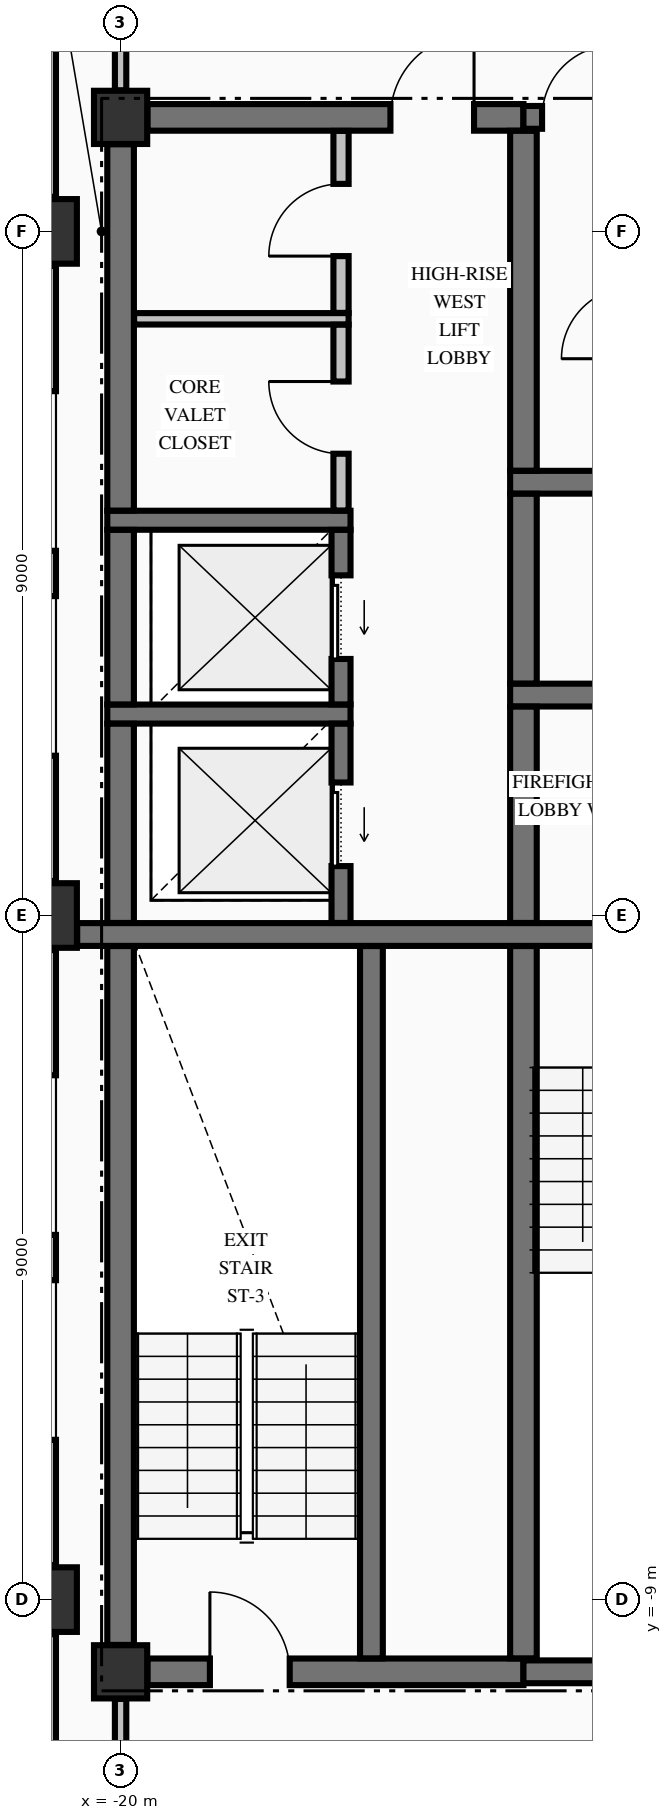
"""IFC4 building model, lengths in metres.
Left out: names, types, materials, properties, quantities, classifications, styles, units other than length and angle.
Written with IfcOpenShell. Run it as: python <this file> out.ifc"""

import sys

from ifc_helpers import new_model, si_unit, direction, frame, frame_2d, origin, origin_2d, place, context, subcontext, project, spatial, rectangle, extrude, element, fill, save


model = new_model("IFC4")
c1 = context("Model", 3, precision=1e-05, world=origin(), true_north=direction((0.0, 1.0)))
c2 = subcontext(c1, "Body", "Model", "MODEL_VIEW")
j1 = project(units=[si_unit("LENGTHUNIT", "METRE"), si_unit("PLANEANGLEUNIT", "RADIAN")], contexts=[c1])
p1 = place(None, origin())
s1 = spatial("IfcSite", under=j1, at=p1, CompositionType="ELEMENT")
p2 = place(p1, origin())
s2 = spatial("IfcBuilding", under=s1, at=p2, CompositionType="ELEMENT")
p3 = place(p2, frame((0.0, 0.0, 239.74)))
s3 = spatial("IfcBuildingStorey", under=s2, at=p3, CompositionType="ELEMENT", Elevation=239.74)
for number, where, z_axis, x_axis in (
    (1, (-21.0, -9.0, -0.25), (0.0, 0.0, 1.0), (1.0, 0.0, 0.0)),
    (2, (-21.0, 0.0, -0.25), (0.0, 0.0, 1.0), (1.0, 0.0, 0.0)),
    (3, (-21.0, 9.0, -0.25), (0.0, 0.0, 1.0), (1.0, 0.0, 0.0)),
):
    element("IfcColumn", number, at=place(p3, frame(where, z_axis=z_axis, x_axis=x_axis)), inside=s3, PredefinedType="COLUMN", context=c2, shape_type="SweptSolid", body=[
        extrude(rectangle(XDim=0.85, YDim=0.85, at=origin_2d()), origin(), (0.0, 0.0, 1.0), 3.23),
    ])
for number, where, z_axis, x_axis in (
    (4, (-20.0, -9.95, -0.25), (0.0, 0.0, 1.0), (1.0, 0.0, 0.0)),
    (5, (-20.0, 10.5, -0.25), (0.0, 0.0, 1.0), (1.0, 0.0, 0.0)),
):
    element("IfcColumn", number, at=place(p3, frame(where, z_axis=z_axis, x_axis=x_axis)), inside=s3, PredefinedType="COLUMN", context=c2, shape_type="SweptSolid", body=[
        extrude(rectangle(XDim=0.7, YDim=0.7, at=origin_2d()), origin(), (0.0, 0.0, 1.0), 3.23),
    ])
p4 = place(p3, frame((-21.0, -9.455, 0.0), z_axis=(0.0, 0.0, 1.0), x_axis=(0.0, -1.0, 0.0)))
e6 = element("IfcWall", 6, at=p4, inside=s3, PredefinedType="STANDARD", context=c2, shape_type="SweptSolid", body=[
    extrude(rectangle(XDim=8.09, YDim=0.3, at=frame_2d((4.045, 0.0))), origin(), (0.0, 0.0, 1.0), 2.372),
])
p5 = place(p3, frame((-21.0, -0.455, 0.0), z_axis=(0.0, 0.0, 1.0), x_axis=(0.0, -1.0, 0.0)))
e7 = element("IfcWall", 7, at=p5, inside=s3, PredefinedType="STANDARD", context=c2, shape_type="SweptSolid", body=[
    extrude(rectangle(XDim=8.09, YDim=0.3, at=frame_2d((4.045, 0.0))), origin(), (0.0, 0.0, 1.0), 2.372),
])
p6 = place(p5, frame((1.647, 0.0, 0.7)))
e8 = element("IfcOpeningElement", 8, at=p6, cuts=e7, PredefinedType="OPENING", context=c2, shape_type="SweptSolid", body=[
    extrude(rectangle(XDim=2.1, YDim=1.5, at=frame_2d((1.05, 0.75))), frame((0.0, 0.16, 0.0), z_axis=(0.0, -1.0, 0.0), x_axis=(1.0, 0.0, 0.0)), (0.0, 0.0, 1.0), 0.32),
])
p7 = place(p5, frame((4.343, 0.0, 0.7)))
e9 = element("IfcOpeningElement", 9, at=p7, cuts=e7, PredefinedType="OPENING", context=c2, shape_type="SweptSolid", body=[
    extrude(rectangle(XDim=2.1, YDim=1.5, at=frame_2d((1.05, 0.75))), frame((0.0, 0.16, 0.0), z_axis=(0.0, -1.0, 0.0), x_axis=(1.0, 0.0, 0.0)), (0.0, 0.0, 1.0), 0.32),
])
p8 = place(p3, frame((-21.0, 8.545, 0.0), z_axis=(0.0, 0.0, 1.0), x_axis=(0.0, -1.0, 0.0)))
e10 = element("IfcWall", 10, at=p8, inside=s3, PredefinedType="STANDARD", context=c2, shape_type="SweptSolid", body=[
    extrude(rectangle(XDim=8.09, YDim=0.3, at=frame_2d((4.045, 0.0))), origin(), (0.0, 0.0, 1.0), 2.372),
])
p9 = place(p8, frame((1.647, 0.0, 0.7)))
e11 = element("IfcOpeningElement", 11, at=p9, cuts=e10, PredefinedType="OPENING", context=c2, shape_type="SweptSolid", body=[
    extrude(rectangle(XDim=2.1, YDim=1.5, at=frame_2d((1.05, 0.75))), frame((0.0, 0.16, 0.0), z_axis=(0.0, -1.0, 0.0), x_axis=(1.0, 0.0, 0.0)), (0.0, 0.0, 1.0), 0.32),
])
p10 = place(p8, frame((4.343, 0.0, 0.7)))
e12 = element("IfcOpeningElement", 12, at=p10, cuts=e10, PredefinedType="OPENING", context=c2, shape_type="SweptSolid", body=[
    extrude(rectangle(XDim=2.1, YDim=1.5, at=frame_2d((1.05, 0.75))), frame((0.0, 0.16, 0.0), z_axis=(0.0, -1.0, 0.0), x_axis=(1.0, 0.0, 0.0)), (0.0, 0.0, 1.0), 0.32),
])
p11 = place(p3, frame((-21.0, 17.545, 0.0), z_axis=(0.0, 0.0, 1.0), x_axis=(0.0, -1.0, 0.0)))
e13 = element("IfcWall", 13, at=p11, inside=s3, PredefinedType="STANDARD", context=c2, shape_type="SweptSolid", body=[
    extrude(rectangle(XDim=8.09, YDim=0.3, at=frame_2d((4.045, 0.0))), origin(), (0.0, 0.0, 1.0), 2.372),
])
p12 = place(p3, frame((-19.646, -9.95, 0.0), z_axis=(0.0, 0.0, 1.0), x_axis=(1.0, 0.0, 0.0)))
e14 = element("IfcWall", 14, at=p12, inside=s3, PredefinedType="SHEAR", context=c2, shape_type="SweptSolid", body=[
    extrude(rectangle(XDim=4.946, YDim=0.35, at=frame_2d((2.473, 0.0))), origin(), (0.0, 0.0, 1.0), 2.98),
])
p13 = place(p12, frame((0.821, 0.0, 0.0)))
e15 = element("IfcOpeningElement", 15, at=p13, cuts=e14, PredefinedType="OPENING", context=c2, shape_type="SweptSolid", body=[
    extrude(rectangle(XDim=1.05, YDim=2.15, at=frame_2d((0.525, 1.075))), frame((0.0, 0.185, 0.0), z_axis=(0.0, -1.0, 0.0), x_axis=(1.0, 0.0, 0.0)), (0.0, 0.0, 1.0), 0.37),
])
p14 = place(p3, frame((-14.7, -9.95, 0.0), z_axis=(0.0, 0.0, 1.0), x_axis=(1.0, 0.0, 0.0)))
e16 = element("IfcWall", 16, at=p14, inside=s3, PredefinedType="SHEAR", context=c2, shape_type="SweptSolid", body=[
    extrude(rectangle(XDim=3.346, YDim=0.3, at=frame_2d((1.673, 0.0))), origin(), (0.0, 0.0, 1.0), 2.98),
])
p15 = place(p3, frame((-20.571, -0.25, 0.0), z_axis=(0.0, 0.0, 1.0), x_axis=(1.0, 0.0, 0.0)))
e17 = element("IfcWall", 17, at=p15, inside=s3, PredefinedType="SHEAR", context=c2, shape_type="SweptSolid", body=[
    extrude(rectangle(XDim=9.217, YDim=0.3, at=frame_2d((4.608, 0.0))), origin(), (0.0, 0.0, 1.0), 2.98),
])
p16 = place(p15, frame((6.871, 0.0, 0.0)))
e18 = element("IfcOpeningElement", 18, at=p16, cuts=e17, PredefinedType="OPENING", context=c2, shape_type="SweptSolid", body=[
    extrude(rectangle(XDim=1.1, YDim=2.15, at=frame_2d((0.55, 1.075))), frame((0.0, 0.16, 0.0), z_axis=(0.0, -1.0, 0.0), x_axis=(1.0, 0.0, 0.0)), (0.0, 0.0, 1.0), 0.32),
])
p17 = place(p3, frame((-20.175, 2.65, 0.0), z_axis=(0.0, 0.0, 1.0), x_axis=(1.0, 0.0, 0.0)))
e19 = element("IfcWall", 19, at=p17, inside=s3, PredefinedType="SOLIDWALL", context=c2, shape_type="SweptSolid", body=[
    extrude(rectangle(XDim=3.2, YDim=0.25, at=frame_2d((1.6, 0.0))), origin(), (0.0, 0.0, 1.0), 2.98),
])
p18 = place(p3, frame((-14.875, 2.9, 0.0), z_axis=(0.0, 0.0, 1.0), x_axis=(1.0, 0.0, 0.0)))
e20 = element("IfcWall", 20, at=p18, inside=s3, PredefinedType="SHEAR", context=c2, shape_type="SweptSolid", body=[
    extrude(rectangle(XDim=4.025, YDim=0.3, at=frame_2d((2.012, 0.0))), origin(), (0.0, 0.0, 1.0), 2.98),
])
p19 = place(p18, frame((2.075, 0.0, 0.0)))
e21 = element("IfcOpeningElement", 21, at=p19, cuts=e20, PredefinedType="OPENING", context=c2, shape_type="SweptSolid", body=[
    extrude(rectangle(XDim=1.1, YDim=2.2, at=frame_2d((0.55, 1.1))), frame((0.0, 0.16, 0.0), z_axis=(0.0, -1.0, 0.0), x_axis=(1.0, 0.0, 0.0)), (0.0, 0.0, 1.0), 0.32),
])
p20 = place(p3, frame((-20.175, 5.2, 0.0), z_axis=(0.0, 0.0, 1.0), x_axis=(1.0, 0.0, 0.0)))
e22 = element("IfcWall", 22, at=p20, inside=s3, PredefinedType="SOLIDWALL", context=c2, shape_type="SweptSolid", body=[
    extrude(rectangle(XDim=3.2, YDim=0.25, at=frame_2d((1.6, 0.0))), origin(), (0.0, 0.0, 1.0), 2.98),
])
p21 = place(p3, frame((-14.875, 5.7, 0.0), z_axis=(0.0, 0.0, 1.0), x_axis=(1.0, 0.0, 0.0)))
e23 = element("IfcWall", 23, at=p21, inside=s3, PredefinedType="SHEAR", context=c2, shape_type="SweptSolid", body=[
    extrude(rectangle(XDim=4.025, YDim=0.3, at=frame_2d((2.012, 0.0))), origin(), (0.0, 0.0, 1.0), 2.98),
])
p22 = place(p3, frame((-19.646, 10.5, 0.0), z_axis=(0.0, 0.0, 1.0), x_axis=(1.0, 0.0, 0.0)))
e24 = element("IfcWall", 24, at=p22, inside=s3, PredefinedType="SHEAR", context=c2, shape_type="SweptSolid", body=[
    extrude(rectangle(XDim=4.946, YDim=0.35, at=frame_2d((2.473, 0.0))), origin(), (0.0, 0.0, 1.0), 2.98),
])
p23 = place(p22, frame((3.196, 0.0, 0.0)))
e25 = element("IfcOpeningElement", 25, at=p23, cuts=e24, PredefinedType="OPENING", context=c2, shape_type="SweptSolid", body=[
    extrude(rectangle(XDim=1.1, YDim=2.15, at=frame_2d((0.55, 1.075))), frame((0.0, 0.185, 0.0), z_axis=(0.0, -1.0, 0.0), x_axis=(1.0, 0.0, 0.0)), (0.0, 0.0, 1.0), 0.37),
])
p24 = place(p3, frame((-14.7, 10.5, 0.0), z_axis=(0.0, 0.0, 1.0), x_axis=(1.0, 0.0, 0.0)))
e26 = element("IfcWall", 26, at=p24, inside=s3, PredefinedType="SHEAR", context=c2, shape_type="SweptSolid", body=[
    extrude(rectangle(XDim=3.346, YDim=0.3, at=frame_2d((1.673, 0.0))), origin(), (0.0, 0.0, 1.0), 2.98),
])
p25 = place(p24, frame((0.245, 0.0, 0.0)))
e27 = element("IfcOpeningElement", 27, at=p25, cuts=e26, PredefinedType="OPENING", context=c2, shape_type="SweptSolid", body=[
    extrude(rectangle(XDim=0.95, YDim=2.15, at=frame_2d((0.475, 1.075))), frame((0.0, 0.16, 0.0), z_axis=(0.0, -1.0, 0.0), x_axis=(1.0, 0.0, 0.0)), (0.0, 0.0, 1.0), 0.32),
])
p26 = place(p3, frame((-19.822, 7.85, 0.0), z_axis=(0.0, 0.0, 1.0), x_axis=(1.0, 0.0, 0.0)))
e28 = element("IfcWall", 28, at=p26, inside=s3, PredefinedType="PARTITIONING", context=c2, shape_type="SweptSolid", body=[
    extrude(rectangle(XDim=2.822, YDim=0.15, at=frame_2d((1.411, 0.0))), origin(), (0.0, 0.0, 1.0), 2.98),
])
p27 = place(p3, frame((-20.0, -9.596, 0.0), z_axis=(0.0, 0.0, 1.0), x_axis=(0.0, 1.0, 0.0)))
e29 = element("IfcWall", 29, at=p27, inside=s3, PredefinedType="SHEAR", context=c2, shape_type="SweptSolid", body=[
    extrude(rectangle(XDim=9.194, YDim=0.35, at=frame_2d((4.597, 0.0))), origin(), (0.0, 0.0, 1.0), 2.98),
])
p28 = place(p3, frame((-20.0, -0.098, 0.0), z_axis=(0.0, 0.0, 1.0), x_axis=(0.0, 1.0, 0.0)))
e30 = element("IfcWall", 30, at=p28, inside=s3, PredefinedType="SHEAR", context=c2, shape_type="SweptSolid", body=[
    extrude(rectangle(XDim=2.621, YDim=0.35, at=frame_2d((1.311, 0.0))), origin(), (0.0, 0.0, 1.0), 2.98),
])
p29 = place(p3, frame((-20.0, 2.777, 0.0), z_axis=(0.0, 0.0, 1.0), x_axis=(0.0, 1.0, 0.0)))
e31 = element("IfcWall", 31, at=p29, inside=s3, PredefinedType="SHEAR", context=c2, shape_type="SweptSolid", body=[
    extrude(rectangle(XDim=2.296, YDim=0.35, at=frame_2d((1.148, 0.0))), origin(), (0.0, 0.0, 1.0), 2.98),
])
p30 = place(p3, frame((-20.0, 5.327, 0.0), z_axis=(0.0, 0.0, 1.0), x_axis=(0.0, 1.0, 0.0)))
e32 = element("IfcWall", 32, at=p30, inside=s3, PredefinedType="SHEAR", context=c2, shape_type="SweptSolid", body=[
    extrude(rectangle(XDim=4.819, YDim=0.35, at=frame_2d((2.41, 0.0))), origin(), (0.0, 0.0, 1.0), 2.98),
])
p31 = place(p3, frame((-17.1, -0.098, 0.0), z_axis=(0.0, 0.0, 1.0), x_axis=(0.0, 1.0, 0.0)))
e33 = element("IfcWall", 33, at=p31, inside=s3, PredefinedType="SOLIDWALL", context=c2, shape_type="SweptSolid", body=[
    extrude(rectangle(XDim=2.621, YDim=0.25, at=frame_2d((1.311, 0.0))), origin(), (0.0, 0.0, 1.0), 2.98),
])
p32 = place(p31, frame((0.748, 0.0, 0.0)))
e34 = element("IfcOpeningElement", 34, at=p32, cuts=e33, PredefinedType="OPENING", context=c2, shape_type="SweptSolid", body=[
    extrude(rectangle(XDim=1.1, YDim=2.2, at=frame_2d((0.55, 1.1))), frame((0.0, 0.135, 0.0), z_axis=(0.0, -1.0, 0.0), x_axis=(1.0, 0.0, 0.0)), (0.0, 0.0, 1.0), 0.27),
])
p33 = place(p3, frame((-17.1, 2.777, 0.0), z_axis=(0.0, 0.0, 1.0), x_axis=(0.0, 1.0, 0.0)))
e35 = element("IfcWall", 35, at=p33, inside=s3, PredefinedType="SOLIDWALL", context=c2, shape_type="SweptSolid", body=[
    extrude(rectangle(XDim=2.296, YDim=0.25, at=frame_2d((1.148, 0.0))), origin(), (0.0, 0.0, 1.0), 2.98),
])
p34 = place(p33, frame((0.598, 0.0, 0.0)))
e36 = element("IfcOpeningElement", 36, at=p34, cuts=e35, PredefinedType="OPENING", context=c2, shape_type="SweptSolid", body=[
    extrude(rectangle(XDim=1.1, YDim=2.2, at=frame_2d((0.55, 1.1))), frame((0.0, 0.135, 0.0), z_axis=(0.0, -1.0, 0.0), x_axis=(1.0, 0.0, 0.0)), (0.0, 0.0, 1.0), 0.27),
])
p35 = place(p3, frame((-16.7, -9.773, 0.0), z_axis=(0.0, 0.0, 1.0), x_axis=(0.0, 1.0, 0.0)))
e37 = element("IfcWall", 37, at=p35, inside=s3, PredefinedType="SHEAR", context=c2, shape_type="SweptSolid", body=[
    extrude(rectangle(XDim=9.371, YDim=0.3, at=frame_2d((4.686, 0.0))), origin(), (0.0, 0.0, 1.0), 2.98),
])
p36 = place(p3, frame((-14.7, -9.773, 0.0), z_axis=(0.0, 0.0, 1.0), x_axis=(0.0, 1.0, 0.0)))
e38 = element("IfcWall", 38, at=p36, inside=s3, PredefinedType="SHEAR", context=c2, shape_type="SweptSolid", body=[
    extrude(rectangle(XDim=9.371, YDim=0.35, at=frame_2d((4.686, 0.0))), origin(), (0.0, 0.0, 1.0), 2.98),
])
p37 = place(p3, frame((-14.7, -0.098, 0.0), z_axis=(0.0, 0.0, 1.0), x_axis=(0.0, 1.0, 0.0)))
e39 = element("IfcWall", 39, at=p37, inside=s3, PredefinedType="SHEAR", context=c2, shape_type="SweptSolid", body=[
    extrude(rectangle(XDim=2.846, YDim=0.35, at=frame_2d((1.423, 0.0))), origin(), (0.0, 0.0, 1.0), 2.98),
])
p38 = place(p3, frame((-14.7, 3.052, 0.0), z_axis=(0.0, 0.0, 1.0), x_axis=(0.0, 1.0, 0.0)))
e40 = element("IfcWall", 40, at=p38, inside=s3, PredefinedType="SHEAR", context=c2, shape_type="SweptSolid", body=[
    extrude(rectangle(XDim=2.496, YDim=0.35, at=frame_2d((1.248, 0.0))), origin(), (0.0, 0.0, 1.0), 2.98),
])
p39 = place(p3, frame((-14.7, 5.852, 0.0), z_axis=(0.0, 0.0, 1.0), x_axis=(0.0, 1.0, 0.0)))
e41 = element("IfcWall", 41, at=p39, inside=s3, PredefinedType="SHEAR", context=c2, shape_type="SweptSolid", body=[
    extrude(rectangle(XDim=4.471, YDim=0.35, at=frame_2d((2.235, 0.0))), origin(), (0.0, 0.0, 1.0), 2.98),
])
p40 = place(p3, frame((-20.0, -12.122, 0.0), z_axis=(0.0, 0.0, 1.0), x_axis=(0.0, 1.0, 0.0)))
e42 = element("IfcWall", 42, at=p40, inside=s3, PredefinedType="PARTITIONING", context=c2, shape_type="SweptSolid", body=[
    extrude(rectangle(XDim=1.816, YDim=0.15, at=frame_2d((0.908, 0.0))), origin(), (0.0, 0.0, 1.0), 2.57),
])
p41 = place(p3, frame((-20.0, 10.856, 0.0), z_axis=(0.0, 0.0, 1.0), x_axis=(0.0, 1.0, 0.0)))
e43 = element("IfcWall", 43, at=p41, inside=s3, PredefinedType="PARTITIONING", context=c2, shape_type="SweptSolid", body=[
    extrude(rectangle(XDim=2.666, YDim=0.15, at=frame_2d((1.333, 0.0))), origin(), (0.0, 0.0, 1.0), 2.57),
])
p42 = place(p3, frame((-17.1, 5.328, 0.0), z_axis=(0.0, 0.0, 1.0), x_axis=(0.0, 1.0, 0.0)))
e44 = element("IfcWall", 44, at=p42, inside=s3, PredefinedType="PARTITIONING", context=c2, shape_type="SweptSolid", body=[
    extrude(rectangle(XDim=2.444, YDim=0.2, at=frame_2d((1.222, 0.0))), origin(), (0.0, 0.0, 1.0), 2.98),
])
p43 = place(p42, frame((0.747, 0.0, 0.0)))
e45 = element("IfcOpeningElement", 45, at=p43, cuts=e44, PredefinedType="OPENING", context=c2, shape_type="SweptSolid", body=[
    extrude(rectangle(XDim=0.95, YDim=2.15, at=frame_2d((0.475, 1.075))), frame((0.0, 0.11, 0.0), z_axis=(0.0, -1.0, 0.0), x_axis=(1.0, 0.0, 0.0)), (0.0, 0.0, 1.0), 0.22),
])
p44 = place(p3, frame((-17.1, 7.928, 0.0), z_axis=(0.0, 0.0, 1.0), x_axis=(0.0, 1.0, 0.0)))
e46 = element("IfcWall", 46, at=p44, inside=s3, PredefinedType="PARTITIONING", context=c2, shape_type="SweptSolid", body=[
    extrude(rectangle(XDim=2.394, YDim=0.2, at=frame_2d((1.197, 0.0))), origin(), (0.0, 0.0, 1.0), 2.98),
])
p45 = place(p44, frame((0.747, 0.0, 0.0)))
e47 = element("IfcOpeningElement", 47, at=p45, cuts=e46, PredefinedType="OPENING", context=c2, shape_type="SweptSolid", body=[
    extrude(rectangle(XDim=0.95, YDim=2.15, at=frame_2d((0.475, 1.075))), frame((0.0, 0.11, 0.0), z_axis=(0.0, -1.0, 0.0), x_axis=(1.0, 0.0, 0.0)), (0.0, 0.0, 1.0), 0.22),
])
p46 = place(p25, origin())
e48 = element("IfcDoor", 48, at=p46, inside=s3, OperationType="SINGLE_SWING_RIGHT", PredefinedType="DOOR", context=c2, shape_type="SweptSolid", body=[
    extrude(rectangle(XDim=0.95, YDim=2.15, at=frame_2d((0.475, 1.075))), frame((0.0, 0.025, 0.0), z_axis=(0.0, -1.0, 0.0), x_axis=(1.0, 0.0, 0.0)), (0.0, 0.0, 1.0), 0.05),
])
fill(e27, e48)
p47 = place(p13, origin())
e49 = element("IfcDoor", 49, at=p47, inside=s3, OperationType="SINGLE_SWING_LEFT", PredefinedType="DOOR", context=c2, shape_type="SweptSolid", body=[
    extrude(rectangle(XDim=1.05, YDim=2.15, at=frame_2d((0.525, 1.075))), frame((0.0, 0.025, 0.0), z_axis=(0.0, -1.0, 0.0), x_axis=(1.0, 0.0, 0.0)), (0.0, 0.0, 1.0), 0.05),
])
fill(e15, e49)
p48 = place(p32, origin())
e50 = element("IfcDoor", 50, at=p48, inside=s3, OperationType="SLIDING_TO_LEFT", PredefinedType="DOOR", context=c2, shape_type="SweptSolid", body=[
    extrude(rectangle(XDim=1.1, YDim=2.2, at=frame_2d((0.55, 1.1))), frame((0.0, 0.025, 0.0), z_axis=(0.0, -1.0, 0.0), x_axis=(1.0, 0.0, 0.0)), (0.0, 0.0, 1.0), 0.05),
])
fill(e34, e50)
p49 = place(p34, origin())
e51 = element("IfcDoor", 51, at=p49, inside=s3, OperationType="SLIDING_TO_LEFT", PredefinedType="DOOR", context=c2, shape_type="SweptSolid", body=[
    extrude(rectangle(XDim=1.1, YDim=2.2, at=frame_2d((0.55, 1.1))), frame((0.0, 0.025, 0.0), z_axis=(0.0, -1.0, 0.0), x_axis=(1.0, 0.0, 0.0)), (0.0, 0.0, 1.0), 0.05),
])
fill(e36, e51)
p50 = place(p23, origin())
e52 = element("IfcDoor", 52, at=p50, inside=s3, OperationType="SINGLE_SWING_RIGHT", PredefinedType="DOOR", context=c2, shape_type="SweptSolid", body=[
    extrude(rectangle(XDim=1.1, YDim=2.15, at=frame_2d((0.55, 1.075))), frame((0.0, 0.025, 0.0), z_axis=(0.0, -1.0, 0.0), x_axis=(1.0, 0.0, 0.0)), (0.0, 0.0, 1.0), 0.05),
])
fill(e25, e52)
p51 = place(p45, origin())
e53 = element("IfcDoor", 53, at=p51, inside=s3, OperationType="SINGLE_SWING_LEFT", PredefinedType="DOOR", context=c2, shape_type="SweptSolid", body=[
    extrude(rectangle(XDim=0.95, YDim=2.15, at=frame_2d((0.475, 1.075))), frame((0.0, 0.025, 0.0), z_axis=(0.0, -1.0, 0.0), x_axis=(1.0, 0.0, 0.0)), (0.0, 0.0, 1.0), 0.05),
])
fill(e47, e53)
p52 = place(p43, origin())
e54 = element("IfcDoor", 54, at=p52, inside=s3, OperationType="SINGLE_SWING_RIGHT", PredefinedType="DOOR", context=c2, shape_type="SweptSolid", body=[
    extrude(rectangle(XDim=0.95, YDim=2.15, at=frame_2d((0.475, 1.075))), frame((0.0, 0.025, 0.0), z_axis=(0.0, -1.0, 0.0), x_axis=(1.0, 0.0, 0.0)), (0.0, 0.0, 1.0), 0.05),
])
fill(e45, e54)
save(model, sys.argv[1])
